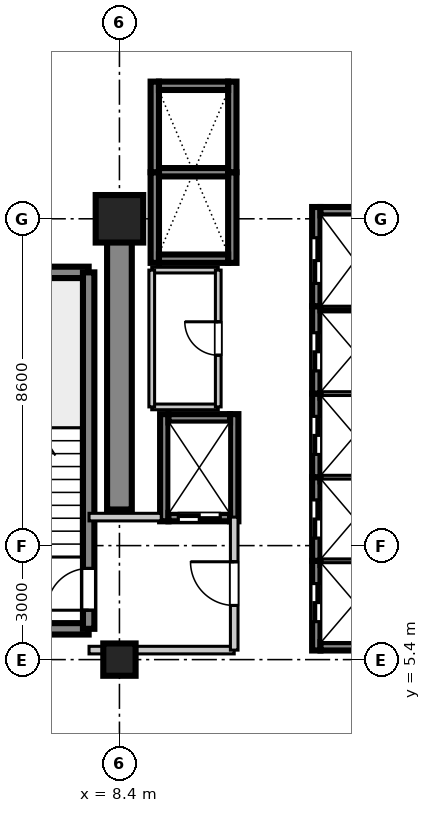
"""IFC4 building model, lengths in metres.
Left out: names, types, materials, properties, quantities, classifications, styles, units other than length and angle.
Written with IfcOpenShell. Run it as: python <this file> out.ifc"""

import sys

from ifc_helpers import new_model, si_unit, direction, frame, frame_2d, origin, origin_2d, place, context, subcontext, project, spatial, rectangle, extrude, source, transform, mapped, element, fill, save


model = new_model("IFC4")
c1 = context("Model", 3, precision=1e-05, world=origin(), true_north=direction((0.0, 1.0)))
c2 = subcontext(c1, "Body", "Model", "MODEL_VIEW")
j1 = project(units=[si_unit("LENGTHUNIT", "METRE"), si_unit("PLANEANGLEUNIT", "RADIAN")], contexts=[c1])
p1 = place(None, origin())
s1 = spatial("IfcSite", under=j1, at=p1, CompositionType="ELEMENT")
p2 = place(p1, origin())
s2 = spatial("IfcBuilding", under=s1, at=p2, CompositionType="ELEMENT")
p3 = place(p2, frame((0.0, 0.0, 91.95)))
s3 = spatial("IfcBuildingStorey", under=s2, at=p3, CompositionType="ELEMENT", Elevation=91.95)
m1 = source(origin(), c2, "Body", "SweptSolid", [
    extrude(rectangle(XDim=0.85, YDim=0.85, at=origin_2d()), origin(), (0.0, 0.0, 1.0), 3.605),
])
p4 = place(p3, frame((8.4, 5.4, 0.0), z_axis=(0.0, 0.0, 1.0), x_axis=(1.0, 0.0, 0.0)))
e1 = element("IfcColumn", 1, at=p4, inside=s3, PredefinedType="PILASTER", context=c2, shape_type="MappedRepresentation", body=[
    mapped(m1, transform((0.0, 0.0, 0.0), scale=1.0)),
])
m2 = source(origin(), c2, "Body", "SweptSolid", [
    extrude(rectangle(XDim=1.25, YDim=1.25, at=origin_2d()), origin(), (0.0, 0.0, 1.0), 3.605),
])
p5 = place(p3, frame((8.4, 17.0, 0.0), z_axis=(0.0, 0.0, 1.0), x_axis=(1.0, 0.0, 0.0)))
e2 = element("IfcColumn", 2, at=p5, inside=s3, PredefinedType="COLUMN", context=c2, shape_type="MappedRepresentation", body=[
    mapped(m2, transform((0.0, 0.0, 0.0), scale=1.0)),
])
m3 = source(origin(), c2, "Body", "SweptSolid", [
    extrude(rectangle(XDim=7.65, YDim=0.65, at=frame_2d((3.825, 0.0))), origin(), (0.0, 0.0, 1.0), 3.38),
])
p6 = place(p3, frame((8.4, 9.35, 0.0), z_axis=(0.0, 0.0, 1.0), x_axis=(0.0, 1.0, 0.0)))
e3 = element("IfcWall", 3, at=p6, inside=s3, PredefinedType="SHEAR", context=c2, shape_type="MappedRepresentation", body=[
    mapped(m3, transform((0.0, 0.0, 0.0), scale=1.0)),
])
m4 = source(origin(), c2, "Body", "SweptSolid", [
    extrude(rectangle(XDim=3.98, YDim=0.3, at=frame_2d((1.99, 0.0))), origin(), (0.0, 0.0, 1.0), 3.38),
])
for number, where, z_axis, x_axis in (
    (4, (3.61, 6.21, 0.0), (0.0, 0.0, 1.0), (1.0, 0.0, 0.0)),
    (5, (3.61, 15.59, 0.0), (0.0, 0.0, 1.0), (1.0, 0.0, 0.0)),
):
    element("IfcWall", number, at=place(p3, frame(where, z_axis=z_axis, x_axis=x_axis)), inside=s3, PredefinedType="SHEAR", context=c2, shape_type="MappedRepresentation", body=[
        mapped(m4, transform((0.0, 0.0, 0.0), scale=1.0)),
    ])
m5 = source(origin(), c2, "Body", "SweptSolid", [
    extrude(rectangle(XDim=9.38, YDim=0.3, at=frame_2d((4.69, 0.0))), origin(), (0.0, 0.0, 1.0), 3.38),
])
p7 = place(p3, frame((7.59, 6.21, 0.0), z_axis=(0.0, 0.0, 1.0), x_axis=(0.0, 1.0, 0.0)))
e6 = element("IfcWall", 6, at=p7, inside=s3, PredefinedType="SHEAR", context=c2, shape_type="MappedRepresentation", body=[
    mapped(m5, transform((0.0, 0.0, 0.0), scale=1.0)),
])
p8 = place(p7, frame((0.49, 0.0, 0.0)))
e7 = element("IfcOpeningElement", 7, at=p8, cuts=e6, PredefinedType="OPENING", context=c2, shape_type="SweptSolid", body=[
    extrude(rectangle(XDim=1.1, YDim=2.15, at=frame_2d((0.55, 1.075))), frame((0.0, 0.16, 0.0), z_axis=(0.0, -1.0, 0.0), x_axis=(1.0, 0.0, 0.0)), (0.0, 0.0, 1.0), 0.32),
])
m6 = source(origin(), c2, "Body", "SweptSolid", [
    extrude(rectangle(XDim=2.36, YDim=0.22, at=frame_2d((1.18, 0.0))), origin(), (0.0, 0.0, 1.0), 3.38),
])
p9 = place(p3, frame((13.58, 5.64, 0.0), z_axis=(0.0, 0.0, 1.0), x_axis=(0.0, 1.0, 0.0)))
e8 = element("IfcWall", 8, at=p9, inside=s3, PredefinedType="SHEAR", context=c2, shape_type="MappedRepresentation", body=[
    mapped(m6, transform((0.0, 0.0, 0.0), scale=1.0)),
])
p10 = place(p9, frame((0.76, 0.0, 0.0)))
e9 = element("IfcOpeningElement", 9, at=p10, cuts=e8, PredefinedType="OPENING", context=c2, shape_type="SweptSolid", body=[
    extrude(rectangle(XDim=1.0, YDim=2.2, at=frame_2d((0.5, 1.1))), frame((0.0, 0.12, 0.0), z_axis=(0.0, -1.0, 0.0), x_axis=(1.0, 0.0, 0.0)), (0.0, 0.0, 1.0), 0.24),
])
m7 = source(origin(), c2, "Body", "SweptSolid", [
    extrude(rectangle(XDim=1.82, YDim=0.22, at=frame_2d((0.91, 0.0))), origin(), (0.0, 0.0, 1.0), 3.38),
])
p11 = place(p3, frame((13.69, 5.75, 0.0), z_axis=(0.0, 0.0, 1.0), x_axis=(1.0, 0.0, 0.0)))
e10 = element("IfcWall", 10, at=p11, inside=s3, PredefinedType="SHEAR", context=c2, shape_type="MappedRepresentation", body=[
    mapped(m7, transform((0.0, 0.0, 0.0), scale=1.0)),
])
m8 = source(origin(), c2, "Body", "SweptSolid", [
    extrude(rectangle(XDim=1.82, YDim=0.22, at=frame_2d((0.91, 0.0))), origin(), (0.0, 0.0, 1.0), 3.65),
])
p12 = place(p3, frame((13.69, 8.0, 0.0), z_axis=(0.0, 0.0, 1.0), x_axis=(1.0, 0.0, 0.0)))
e11 = element("IfcWall", 11, at=p12, inside=s3, PredefinedType="SHEAR", context=c2, shape_type="MappedRepresentation", body=[
    mapped(m8, transform((0.0, 0.0, 0.0), scale=1.0)),
])
m9 = source(origin(), c2, "Body", "SweptSolid", [
    extrude(rectangle(XDim=2.2, YDim=0.22, at=frame_2d((1.1, 0.0))), origin(), (0.0, 0.0, 1.0), 3.38),
])
p13 = place(p3, frame((13.58, 8.0, 0.0), z_axis=(0.0, 0.0, 1.0), x_axis=(0.0, 1.0, 0.0)))
e12 = element("IfcWall", 12, at=p13, inside=s3, PredefinedType="SHEAR", context=c2, shape_type="MappedRepresentation", body=[
    mapped(m9, transform((0.0, 0.0, 0.0), scale=1.0)),
])
p14 = place(p13, frame((0.6, 0.0, 0.0)))
e13 = element("IfcOpeningElement", 13, at=p14, cuts=e12, PredefinedType="OPENING", context=c2, shape_type="SweptSolid", body=[
    extrude(rectangle(XDim=1.0, YDim=2.2, at=frame_2d((0.5, 1.1))), frame((0.0, 0.12, 0.0), z_axis=(0.0, -1.0, 0.0), x_axis=(1.0, 0.0, 0.0)), (0.0, 0.0, 1.0), 0.24),
])
p15 = place(p3, frame((13.69, 10.2, 0.0), z_axis=(0.0, 0.0, 1.0), x_axis=(1.0, 0.0, 0.0)))
e14 = element("IfcWall", 14, at=p15, inside=s3, PredefinedType="SHEAR", context=c2, shape_type="MappedRepresentation", body=[
    mapped(m8, transform((0.0, 0.0, 0.0), scale=1.0)),
])
p16 = place(p3, frame((13.58, 10.2, 0.0), z_axis=(0.0, 0.0, 1.0), x_axis=(0.0, 1.0, 0.0)))
e15 = element("IfcWall", 15, at=p16, inside=s3, PredefinedType="SHEAR", context=c2, shape_type="MappedRepresentation", body=[
    mapped(m9, transform((0.0, 0.0, 0.0), scale=1.0)),
])
p17 = place(p16, frame((0.6, 0.0, 0.0)))
e16 = element("IfcOpeningElement", 16, at=p17, cuts=e15, PredefinedType="OPENING", context=c2, shape_type="SweptSolid", body=[
    extrude(rectangle(XDim=1.0, YDim=2.2, at=frame_2d((0.5, 1.1))), frame((0.0, 0.12, 0.0), z_axis=(0.0, -1.0, 0.0), x_axis=(1.0, 0.0, 0.0)), (0.0, 0.0, 1.0), 0.24),
])
p18 = place(p3, frame((13.69, 12.4, 0.0), z_axis=(0.0, 0.0, 1.0), x_axis=(1.0, 0.0, 0.0)))
e17 = element("IfcWall", 17, at=p18, inside=s3, PredefinedType="SHEAR", context=c2, shape_type="MappedRepresentation", body=[
    mapped(m8, transform((0.0, 0.0, 0.0), scale=1.0)),
])
m10 = source(origin(), c2, "Body", "SweptSolid", [
    extrude(rectangle(XDim=2.3, YDim=0.22, at=frame_2d((1.15, 0.0))), origin(), (0.0, 0.0, 1.0), 3.38),
])
p19 = place(p3, frame((13.58, 12.4, 0.0), z_axis=(0.0, 0.0, 1.0), x_axis=(0.0, 1.0, 0.0)))
e18 = element("IfcWall", 18, at=p19, inside=s3, PredefinedType="SHEAR", context=c2, shape_type="MappedRepresentation", body=[
    mapped(m10, transform((0.0, 0.0, 0.0), scale=1.0)),
])
p20 = place(p19, frame((0.6, 0.0, 0.0)))
e19 = element("IfcOpeningElement", 19, at=p20, cuts=e18, PredefinedType="OPENING", context=c2, shape_type="SweptSolid", body=[
    extrude(rectangle(XDim=1.0, YDim=2.2, at=frame_2d((0.5, 1.1))), frame((0.0, 0.12, 0.0), z_axis=(0.0, -1.0, 0.0), x_axis=(1.0, 0.0, 0.0)), (0.0, 0.0, 1.0), 0.24),
])
p21 = place(p3, frame((13.69, 14.7, 0.0), z_axis=(0.0, 0.0, 1.0), x_axis=(1.0, 0.0, 0.0)))
e20 = element("IfcWall", 20, at=p21, inside=s3, PredefinedType="SHEAR", context=c2, shape_type="MappedRepresentation", body=[
    mapped(m8, transform((0.0, 0.0, 0.0), scale=1.0)),
])
m11 = source(origin(), c2, "Body", "SweptSolid", [
    extrude(rectangle(XDim=2.385, YDim=0.22, at=frame_2d((1.192, 0.0))), origin(), (0.0, 0.0, 1.0), 3.38),
])
for number, where, z_axis, x_axis in (
    (21, (9.33, 15.84, 0.0), (0.0, 0.0, 1.0), (0.0, 1.0, 0.0)),
    (22, (11.37, 15.84, 0.0), (0.0, 0.0, 1.0), (0.0, 1.0, 0.0)),
):
    element("IfcWall", number, at=place(p3, frame(where, z_axis=z_axis, x_axis=x_axis)), inside=s3, PredefinedType="SHEAR", context=c2, shape_type="MappedRepresentation", body=[
        mapped(m11, transform((0.0, 0.0, 0.0), scale=1.0)),
    ])
p22 = place(p3, frame((9.44, 15.95, 0.0), z_axis=(0.0, 0.0, 1.0), x_axis=(1.0, 0.0, 0.0)))
e23 = element("IfcWall", 23, at=p22, inside=s3, PredefinedType="SHEAR", context=c2, shape_type="MappedRepresentation", body=[
    mapped(m7, transform((0.0, 0.0, 0.0), scale=1.0)),
])
p23 = place(p3, frame((9.44, 18.225, 0.0), z_axis=(0.0, 0.0, 1.0), x_axis=(1.0, 0.0, 0.0)))
e24 = element("IfcWall", 24, at=p23, inside=s3, PredefinedType="SHEAR", context=c2, shape_type="MappedRepresentation", body=[
    mapped(m8, transform((0.0, 0.0, 0.0), scale=1.0)),
])
for number, where, z_axis, x_axis in (
    (25, (9.33, 18.225, 0.0), (0.0, 0.0, 1.0), (0.0, 1.0, 0.0)),
    (26, (11.37, 18.225, 0.0), (0.0, 0.0, 1.0), (0.0, 1.0, 0.0)),
):
    element("IfcWall", number, at=place(p3, frame(where, z_axis=z_axis, x_axis=x_axis)), inside=s3, PredefinedType="SHEAR", context=c2, shape_type="MappedRepresentation", body=[
        mapped(m11, transform((0.0, 0.0, 0.0), scale=1.0)),
    ])
p24 = place(p3, frame((9.44, 20.5, 0.0), z_axis=(0.0, 0.0, 1.0), x_axis=(1.0, 0.0, 0.0)))
e27 = element("IfcWall", 27, at=p24, inside=s3, PredefinedType="SHEAR", context=c2, shape_type="MappedRepresentation", body=[
    mapped(m7, transform((0.0, 0.0, 0.0), scale=1.0)),
])
m12 = source(origin(), c2, "Body", "SweptSolid", [
    extrude(rectangle(XDim=2.82, YDim=0.22, at=frame_2d((1.41, 0.0))), origin(), (0.0, 0.0, 1.0), 3.38),
])
for number, where, z_axis, x_axis in (
    (28, (9.58, 9.04, 0.0), (0.0, 0.0, 1.0), (0.0, 1.0, 0.0)),
    (29, (11.42, 9.04, 0.0), (0.0, 0.0, 1.0), (0.0, 1.0, 0.0)),
):
    element("IfcWall", number, at=place(p3, frame(where, z_axis=z_axis, x_axis=x_axis)), inside=s3, PredefinedType="SHEAR", context=c2, shape_type="MappedRepresentation", body=[
        mapped(m12, transform((0.0, 0.0, 0.0), scale=1.0)),
    ])
m13 = source(origin(), c2, "Body", "SweptSolid", [
    extrude(rectangle(XDim=1.62, YDim=0.22, at=frame_2d((0.81, 0.0))), origin(), (0.0, 0.0, 1.0), 3.38),
])
p25 = place(p3, frame((9.69, 9.15, 0.0), z_axis=(0.0, 0.0, 1.0), x_axis=(1.0, 0.0, 0.0)))
e30 = element("IfcWall", 30, at=p25, inside=s3, PredefinedType="SHEAR", context=c2, shape_type="MappedRepresentation", body=[
    mapped(m13, transform((0.0, 0.0, 0.0), scale=1.0)),
])
p26 = place(p25, frame((0.26, 0.0, 0.0)))
e31 = element("IfcOpeningElement", 31, at=p26, cuts=e30, PredefinedType="OPENING", context=c2, shape_type="SweptSolid", body=[
    extrude(rectangle(XDim=1.1, YDim=2.2, at=frame_2d((0.55, 1.1))), frame((0.0, 0.12, 0.0), z_axis=(0.0, -1.0, 0.0), x_axis=(1.0, 0.0, 0.0)), (0.0, 0.0, 1.0), 0.24),
])
p27 = place(p3, frame((9.69, 11.75, 0.0), z_axis=(0.0, 0.0, 1.0), x_axis=(1.0, 0.0, 0.0)))
e32 = element("IfcWall", 32, at=p27, inside=s3, PredefinedType="SHEAR", context=c2, shape_type="MappedRepresentation", body=[
    mapped(m13, transform((0.0, 0.0, 0.0), scale=1.0)),
])
m14 = source(origin(), c2, "Body", "SweptSolid", [
    extrude(rectangle(XDim=2.61, YDim=0.22, at=frame_2d((1.305, 0.0))), origin(), (0.0, 0.0, 1.0), 3.38),
])
p28 = place(p3, frame((13.58, 14.7, 0.0), z_axis=(0.0, 0.0, 1.0), x_axis=(0.0, 1.0, 0.0)))
e33 = element("IfcWall", 33, at=p28, inside=s3, PredefinedType="SHEAR", context=c2, shape_type="MappedRepresentation", body=[
    mapped(m14, transform((0.0, 0.0, 0.0), scale=1.0)),
])
p29 = place(p28, frame((0.6, 0.0, 0.0)))
e34 = element("IfcOpeningElement", 34, at=p29, cuts=e33, PredefinedType="OPENING", context=c2, shape_type="SweptSolid", body=[
    extrude(rectangle(XDim=1.2, YDim=2.2, at=frame_2d((0.6, 1.1))), frame((0.0, 0.12, 0.0), z_axis=(0.0, -1.0, 0.0), x_axis=(1.0, 0.0, 0.0)), (0.0, 0.0, 1.0), 0.24),
])
p30 = place(p3, frame((13.69, 17.2, 0.0), z_axis=(0.0, 0.0, 1.0), x_axis=(1.0, 0.0, 0.0)))
e35 = element("IfcWall", 35, at=p30, inside=s3, PredefinedType="SHEAR", context=c2, shape_type="MappedRepresentation", body=[
    mapped(m7, transform((0.0, 0.0, 0.0), scale=1.0)),
])
m15 = source(origin(), c2, "Body", "SweptSolid", [
    extrude(rectangle(XDim=3.82, YDim=0.2, at=frame_2d((1.91, 0.0))), origin(), (0.0, 0.0, 1.0), 2.72),
])
p31 = place(p3, frame((7.6, 5.65, 0.0), z_axis=(0.0, 0.0, 1.0), x_axis=(1.0, 0.0, 0.0)))
e36 = element("IfcWall", 36, at=p31, inside=s3, PredefinedType="PARTITIONING", context=c2, shape_type="MappedRepresentation", body=[
    mapped(m15, transform((0.0, 0.0, 0.0), scale=1.0)),
])
m16 = source(origin(), c2, "Body", "SweptSolid", [
    extrude(rectangle(XDim=1.9, YDim=0.2, at=frame_2d((0.95, 0.0))), origin(), (0.0, 0.0, 1.0), 2.72),
])
p32 = place(p3, frame((7.6, 9.15, 0.0), z_axis=(0.0, 0.0, 1.0), x_axis=(1.0, 0.0, 0.0)))
e37 = element("IfcWall", 37, at=p32, inside=s3, PredefinedType="PARTITIONING", context=c2, shape_type="MappedRepresentation", body=[
    mapped(m16, transform((0.0, 0.0, 0.0), scale=1.0)),
])
m17 = source(origin(), c2, "Body", "SweptSolid", [
    extrude(rectangle(XDim=3.5, YDim=0.2, at=frame_2d((1.75, 0.0))), origin(), (0.0, 0.0, 1.0), 2.72),
])
p33 = place(p3, frame((11.42, 5.65, 0.0), z_axis=(0.0, 0.0, 1.0), x_axis=(0.0, 1.0, 0.0)))
e38 = element("IfcWall", 38, at=p33, inside=s3, PredefinedType="PARTITIONING", context=c2, shape_type="MappedRepresentation", body=[
    mapped(m17, transform((0.0, 0.0, 0.0), scale=1.0)),
])
p34 = place(p33, frame((1.175, 0.0, 0.0)))
e39 = element("IfcOpeningElement", 39, at=p34, cuts=e38, PredefinedType="OPENING", context=c2, shape_type="SweptSolid", body=[
    extrude(rectangle(XDim=1.15, YDim=2.15, at=frame_2d((0.575, 1.075))), frame((0.0, 0.11, 0.0), z_axis=(0.0, -1.0, 0.0), x_axis=(1.0, 0.0, 0.0)), (0.0, 0.0, 1.0), 0.22),
])
m18 = source(origin(), c2, "Body", "SweptSolid", [
    extrude(rectangle(XDim=1.75, YDim=0.15, at=frame_2d((0.875, 0.0))), origin(), (0.0, 0.0, 1.0), 2.72),
])
for number, where, z_axis, x_axis in (
    (40, (9.25, 12.05, 0.0), (0.0, 0.0, 1.0), (1.0, 0.0, 0.0)),
    (41, (9.25, 15.65, 0.0), (0.0, 0.0, 1.0), (1.0, 0.0, 0.0)),
):
    element("IfcWall", number, at=place(p3, frame(where, z_axis=z_axis, x_axis=x_axis)), inside=s3, PredefinedType="PARTITIONING", context=c2, shape_type="MappedRepresentation", body=[
        mapped(m18, transform((0.0, 0.0, 0.0), scale=1.0)),
    ])
m19 = source(origin(), c2, "Body", "SweptSolid", [
    extrude(rectangle(XDim=3.6, YDim=0.15, at=frame_2d((1.8, 0.0))), origin(), (0.0, 0.0, 1.0), 2.72),
])
p35 = place(p3, frame((9.25, 12.05, 0.0), z_axis=(0.0, 0.0, 1.0), x_axis=(0.0, 1.0, 0.0)))
e42 = element("IfcWall", 42, at=p35, inside=s3, PredefinedType="PARTITIONING", context=c2, shape_type="MappedRepresentation", body=[
    mapped(m19, transform((0.0, 0.0, 0.0), scale=1.0)),
])
p36 = place(p3, frame((11.0, 12.05, 0.0), z_axis=(0.0, 0.0, 1.0), x_axis=(0.0, 1.0, 0.0)))
e43 = element("IfcWall", 43, at=p36, inside=s3, PredefinedType="PARTITIONING", context=c2, shape_type="MappedRepresentation", body=[
    mapped(m19, transform((0.0, 0.0, 0.0), scale=1.0)),
])
p37 = place(p36, frame((1.36, 0.0, 0.0)))
e44 = element("IfcOpeningElement", 44, at=p37, cuts=e43, PredefinedType="OPENING", context=c2, shape_type="SweptSolid", body=[
    extrude(rectangle(XDim=0.88, YDim=2.1, at=frame_2d((0.44, 1.05))), frame((0.0, 0.085, 0.0), z_axis=(0.0, -1.0, 0.0), x_axis=(1.0, 0.0, 0.0)), (0.0, 0.0, 1.0), 0.17),
])
m20 = source(origin(), c2, "Body", "SweptSolid", [
    extrude(rectangle(XDim=1.1, YDim=2.15, at=frame_2d((0.55, 1.075))), frame((0.0, 0.025, 0.0), z_axis=(0.0, -1.0, 0.0), x_axis=(1.0, 0.0, 0.0)), (0.0, 0.0, 1.0), 0.05),
])
p38 = place(p8, origin())
e45 = element("IfcDoor", 45, at=p38, inside=s3, OperationType="SINGLE_SWING_LEFT", PredefinedType="DOOR", context=c2, shape_type="MappedRepresentation", body=[
    mapped(m20, transform((0.0, 0.0, 0.0), scale=1.0)),
])
fill(e7, e45)
m21 = source(origin(), c2, "Body", "SweptSolid", [
    extrude(rectangle(XDim=1.0, YDim=2.2, at=frame_2d((0.5, 1.1))), frame((0.0, 0.025, 0.0), z_axis=(0.0, -1.0, 0.0), x_axis=(1.0, 0.0, 0.0)), (0.0, 0.0, 1.0), 0.05),
])
p39 = place(p10, origin())
e46 = element("IfcDoor", 46, at=p39, inside=s3, OperationType="DOUBLE_DOOR_SLIDING", PredefinedType="DOOR", context=c2, shape_type="MappedRepresentation", body=[
    mapped(m21, transform((0.0, 0.0, 0.0), scale=1.0)),
])
fill(e9, e46)
p40 = place(p14, origin())
e47 = element("IfcDoor", 47, at=p40, inside=s3, OperationType="DOUBLE_DOOR_SLIDING", PredefinedType="DOOR", context=c2, shape_type="MappedRepresentation", body=[
    mapped(m21, transform((0.0, 0.0, 0.0), scale=1.0)),
])
fill(e13, e47)
p41 = place(p17, origin())
e48 = element("IfcDoor", 48, at=p41, inside=s3, OperationType="DOUBLE_DOOR_SLIDING", PredefinedType="DOOR", context=c2, shape_type="MappedRepresentation", body=[
    mapped(m21, transform((0.0, 0.0, 0.0), scale=1.0)),
])
fill(e16, e48)
p42 = place(p20, origin())
e49 = element("IfcDoor", 49, at=p42, inside=s3, OperationType="DOUBLE_DOOR_SLIDING", PredefinedType="DOOR", context=c2, shape_type="MappedRepresentation", body=[
    mapped(m21, transform((0.0, 0.0, 0.0), scale=1.0)),
])
fill(e19, e49)
m22 = source(origin(), c2, "Body", "SweptSolid", [
    extrude(rectangle(XDim=1.1, YDim=2.2, at=frame_2d((0.55, 1.1))), frame((0.0, 0.025, 0.0), z_axis=(0.0, -1.0, 0.0), x_axis=(1.0, 0.0, 0.0)), (0.0, 0.0, 1.0), 0.05),
])
p43 = place(p26, frame((1.1, 0.0, 0.0), z_axis=(0.0, 0.0, 1.0), x_axis=(-1.0, 0.0, 0.0)))
e50 = element("IfcDoor", 50, at=p43, inside=s3, OperationType="DOUBLE_DOOR_SLIDING", PredefinedType="DOOR", context=c2, shape_type="MappedRepresentation", body=[
    mapped(m22, transform((0.0, 0.0, 0.0), scale=1.0)),
])
fill(e31, e50)
m23 = source(origin(), c2, "Body", "SweptSolid", [
    extrude(rectangle(XDim=1.2, YDim=2.2, at=frame_2d((0.6, 1.1))), frame((0.0, 0.025, 0.0), z_axis=(0.0, -1.0, 0.0), x_axis=(1.0, 0.0, 0.0)), (0.0, 0.0, 1.0), 0.05),
])
p44 = place(p29, origin())
e51 = element("IfcDoor", 51, at=p44, inside=s3, OperationType="DOUBLE_DOOR_SLIDING", PredefinedType="DOOR", context=c2, shape_type="MappedRepresentation", body=[
    mapped(m23, transform((0.0, 0.0, 0.0), scale=1.0)),
])
fill(e34, e51)
m24 = source(origin(), c2, "Body", "SweptSolid", [
    extrude(rectangle(XDim=1.15, YDim=2.15, at=frame_2d((0.575, 1.075))), frame((0.0, 0.025, 0.0), z_axis=(0.0, -1.0, 0.0), x_axis=(1.0, 0.0, 0.0)), (0.0, 0.0, 1.0), 0.05),
])
p45 = place(p34, frame((1.15, 0.0, 0.0), z_axis=(0.0, 0.0, 1.0), x_axis=(-1.0, 0.0, 0.0)))
e52 = element("IfcDoor", 52, at=p45, inside=s3, OperationType="SINGLE_SWING_RIGHT", PredefinedType="DOOR", context=c2, shape_type="MappedRepresentation", body=[
    mapped(m24, transform((0.0, 0.0, 0.0), scale=1.0)),
])
fill(e39, e52)
m25 = source(origin(), c2, "Body", "SweptSolid", [
    extrude(rectangle(XDim=0.88, YDim=2.1, at=frame_2d((0.44, 1.05))), frame((0.0, 0.025, 0.0), z_axis=(0.0, -1.0, 0.0), x_axis=(1.0, 0.0, 0.0)), (0.0, 0.0, 1.0), 0.05),
])
p46 = place(p37, origin())
e53 = element("IfcDoor", 53, at=p46, inside=s3, OperationType="SINGLE_SWING_RIGHT", PredefinedType="DOOR", context=c2, shape_type="MappedRepresentation", body=[
    mapped(m25, transform((0.0, 0.0, 0.0), scale=1.0)),
])
fill(e44, e53)
save(model, sys.argv[1])
